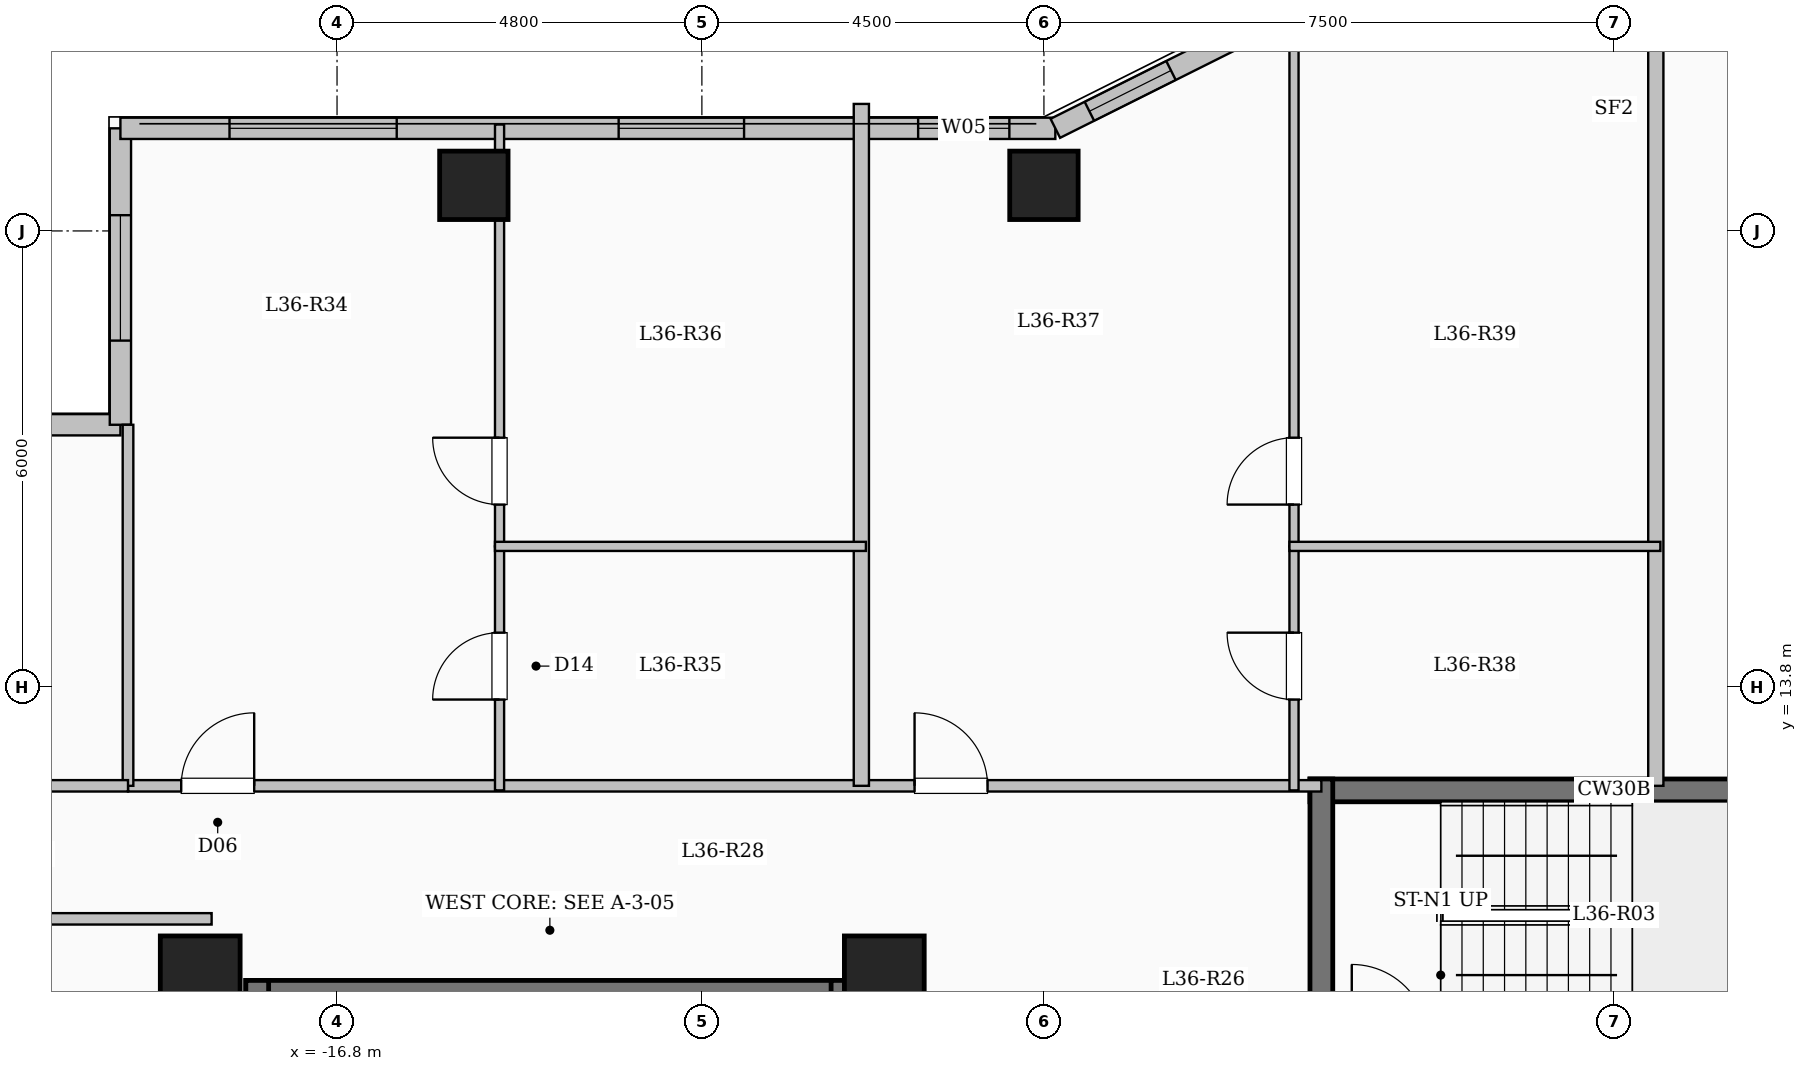
"""IFC4 building model, lengths in metres.
Left out: names, types, materials, properties, quantities, classifications, styles, units other than length and angle.
Written with IfcOpenShell. Run it as: python <this file> out.ifc"""

import sys

from ifc_helpers import new_model, si_unit, direction, frame, frame_2d, origin, origin_2d, place, context, subcontext, project, spatial, rectangle, extrude, element, fill, save


model = new_model("IFC4")
c1 = context("Model", 3, precision=1e-05, world=origin(), true_north=direction((0.0, 1.0)))
c2 = subcontext(c1, "Body", "Model", "MODEL_VIEW")
j1 = project(units=[si_unit("LENGTHUNIT", "METRE"), si_unit("PLANEANGLEUNIT", "RADIAN")], contexts=[c1])
p1 = place(None, origin())
s1 = spatial("IfcSite", under=j1, at=p1, CompositionType="ELEMENT")
p2 = place(p1, origin())
s2 = spatial("IfcBuilding", under=s1, at=p2, CompositionType="ELEMENT")
p3 = place(p2, frame((0.0, 0.0, 135.95)))
s3 = spatial("IfcBuildingStorey", under=s2, at=p3, CompositionType="ELEMENT", Elevation=135.95)
for number, where, z_axis, x_axis in (
    (1, (-9.6, 10.0, 0.0), (0.0, 0.0, 1.0), (1.0, 0.0, 0.0)),
    (2, (-18.6, 10.0, 0.0), (0.0, 0.0, 1.0), (1.0, 0.0, 0.0)),
):
    element("IfcColumn", number, at=place(p3, frame(where, z_axis=z_axis, x_axis=x_axis)), inside=s3, PredefinedType="COLUMN", context=c2, shape_type="SweptSolid", body=[
        extrude(rectangle(XDim=1.05, YDim=1.05, at=origin_2d()), origin(), (0.0, 0.0, 1.0), 3.35),
    ])
for number, where, z_axis, x_axis in (
    (3, (-15.0, 20.4, 0.0), (0.0, 0.0, 1.0), (1.0, 0.0, 0.0)),
    (4, (-7.5, 20.4, 0.0), (0.0, 0.0, 1.0), (1.0, 0.0, 0.0)),
):
    element("IfcColumn", number, at=place(p3, frame(where, z_axis=z_axis, x_axis=x_axis)), inside=s3, PredefinedType="COLUMN", context=c2, shape_type="SweptSolid", body=[
        extrude(rectangle(XDim=0.9, YDim=0.9, at=origin_2d()), origin(), (0.0, 0.0, 1.0), 3.35),
    ])
p4 = place(p3, frame((-25.05, 17.25, 0.0), z_axis=(0.0, 0.0, 1.0), x_axis=(1.0, 0.0, 0.0)))
e5 = element("IfcWall", 5, at=p4, inside=s3, PredefinedType="SOLIDWALL", context=c2, shape_type="SweptSolid", body=[
    extrude(rectangle(XDim=5.4, YDim=0.28, at=frame_2d((2.7, 0.0))), origin(), (0.0, 0.0, 1.0), 3.1),
])
p5 = place(p4, frame((1.725, 0.0, 0.9)))
e6 = element("IfcOpeningElement", 6, at=p5, cuts=e5, PredefinedType="OPENING", context=c2, shape_type="SweptSolid", body=[
    extrude(rectangle(XDim=2.0, YDim=1.7, at=frame_2d((1.0, 0.85))), frame((0.0, 0.15, 0.0), z_axis=(0.0, -1.0, 0.0), x_axis=(1.0, 0.0, 0.0)), (0.0, 0.0, 1.0), 0.3),
])
p6 = place(p3, frame((-19.65, 17.25, 0.0), z_axis=(0.0, 0.0, 1.0), x_axis=(0.0, 1.0, 0.0)))
e7 = element("IfcWall", 7, at=p6, inside=s3, PredefinedType="SOLIDWALL", context=c2, shape_type="SweptSolid", body=[
    extrude(rectangle(XDim=3.9, YDim=0.28, at=frame_2d((1.95, 0.0))), origin(), (0.0, 0.0, 1.0), 3.1),
])
p7 = place(p6, frame((1.107, 0.0, 0.9)))
e8 = element("IfcOpeningElement", 8, at=p7, cuts=e7, PredefinedType="OPENING", context=c2, shape_type="SweptSolid", body=[
    extrude(rectangle(XDim=1.65, YDim=1.6, at=frame_2d((0.825, 0.8))), frame((0.0, 0.15, 0.0), z_axis=(0.0, -1.0, 0.0), x_axis=(1.0, 0.0, 0.0)), (0.0, 0.0, 1.0), 0.3),
])
p8 = place(p3, frame((-19.65, 21.15, 0.0), z_axis=(0.0, 0.0, 1.0), x_axis=(1.0, 0.0, 0.0)))
e9 = element("IfcWall", 9, at=p8, inside=s3, PredefinedType="SOLIDWALL", context=c2, shape_type="SweptSolid", body=[
    extrude(rectangle(XDim=12.3, YDim=0.28, at=frame_2d((6.15, 0.0))), origin(), (0.0, 0.0, 1.0), 3.1),
])
p9 = place(p8, frame((1.435, 0.0, 0.9)))
e10 = element("IfcOpeningElement", 10, at=p9, cuts=e9, PredefinedType="OPENING", context=c2, shape_type="SweptSolid", body=[
    extrude(rectangle(XDim=2.2, YDim=1.75, at=frame_2d((1.1, 0.875))), frame((0.0, 0.15, 0.0), z_axis=(0.0, -1.0, 0.0), x_axis=(1.0, 0.0, 0.0)), (0.0, 0.0, 1.0), 0.3),
])
p10 = place(p8, frame((6.555, 0.0, 0.9)))
e11 = element("IfcOpeningElement", 11, at=p10, cuts=e9, PredefinedType="OPENING", context=c2, shape_type="SweptSolid", body=[
    extrude(rectangle(XDim=1.65, YDim=1.6, at=frame_2d((0.825, 0.8))), frame((0.0, 0.15, 0.0), z_axis=(0.0, -1.0, 0.0), x_axis=(1.0, 0.0, 0.0)), (0.0, 0.0, 1.0), 0.3),
])
p11 = place(p8, frame((10.495, 0.0, 0.95)))
e12 = element("IfcOpeningElement", 12, at=p11, cuts=e9, PredefinedType="OPENING", context=c2, shape_type="SweptSolid", body=[
    extrude(rectangle(XDim=1.2, YDim=1.5, at=frame_2d((0.6, 0.75))), frame((0.0, 0.15, 0.0), z_axis=(0.0, -1.0, 0.0), x_axis=(1.0, 0.0, 0.0)), (0.0, 0.0, 1.0), 0.3),
])
p12 = place(p3, frame((-7.35, 21.15, 0.0), z_axis=(0.0, 0.0, 1.0), x_axis=(0.894427191, 0.4472135955, 0.0)))
e13 = element("IfcWall", 13, at=p12, inside=s3, PredefinedType="SOLIDWALL", context=c2, shape_type="SweptSolid", body=[
    extrude(rectangle(XDim=3.354, YDim=0.28, at=frame_2d((1.677, 0.0))), origin(), (0.0, 0.0, 1.0), 3.1),
])
p13 = place(p12, frame((0.501, 0.0, 0.95)))
e14 = element("IfcOpeningElement", 14, at=p13, cuts=e13, PredefinedType="OPENING", context=c2, shape_type="SweptSolid", body=[
    extrude(rectangle(XDim=1.2, YDim=1.5, at=frame_2d((0.6, 0.75))), frame((0.0, 0.15, 0.0), z_axis=(0.0, -1.0, 0.0), x_axis=(1.0, 0.0, 0.0)), (0.0, 0.0, 1.0), 0.3),
])
p14 = place(p3, frame((-18.0, 9.79, 0.0), z_axis=(0.0, 0.0, 1.0), x_axis=(1.0, 0.0, 0.0)))
e15 = element("IfcWall", 15, at=p14, inside=s3, PredefinedType="SHEAR", context=c2, shape_type="SweptSolid", body=[
    extrude(rectangle(XDim=8.0, YDim=0.3, at=frame_2d((4.0, 0.0))), origin(), (0.0, 0.0, 1.0), 3.35),
])
for number, where, z_axis, x_axis in (
    (16, (-17.85, 6.35, 0.0), (0.0, 0.0, 1.0), (0.0, 1.0, 0.0)),
    (17, (-10.15, 6.35, 0.0), (0.0, 0.0, 1.0), (0.0, 1.0, 0.0)),
):
    element("IfcWall", number, at=place(p3, frame(where, z_axis=z_axis, x_axis=x_axis)), inside=s3, PredefinedType="SHEAR", context=c2, shape_type="SweptSolid", body=[
        extrude(rectangle(XDim=3.59, YDim=0.3, at=frame_2d((1.795, 0.0))), origin(), (0.0, 0.0, 1.0), 3.35),
    ])
p15 = place(p3, frame((-4.0, 12.44, 0.0), z_axis=(0.0, 0.0, 1.0), x_axis=(1.0, 0.0, 0.0)))
e18 = element("IfcWall", 18, at=p15, inside=s3, PredefinedType="SHEAR", context=c2, shape_type="SweptSolid", body=[
    extrude(rectangle(XDim=8.0, YDim=0.3, at=frame_2d((4.0, 0.0))), origin(), (0.0, 0.0, 1.0), 3.35),
])
p16 = place(p3, frame((-3.85, 9.0, 0.0), z_axis=(0.0, 0.0, 1.0), x_axis=(0.0, 1.0, 0.0)))
e19 = element("IfcWall", 19, at=p16, inside=s3, PredefinedType="SHEAR", context=c2, shape_type="SweptSolid", body=[
    extrude(rectangle(XDim=3.59, YDim=0.3, at=frame_2d((1.795, 0.0))), origin(), (0.0, 0.0, 1.0), 3.35),
])
p17 = place(p3, frame((-19.55, 12.5, 0.0), z_axis=(0.0, 0.0, 1.0), x_axis=(1.0, 0.0, 0.0)))
e20 = element("IfcWall", 20, at=p17, inside=s3, PredefinedType="PARTITIONING", context=c2, shape_type="SweptSolid", body=[
    extrude(rectangle(XDim=15.7, YDim=0.15, at=frame_2d((7.85, 0.0))), origin(), (0.0, 0.0, 1.0), 3.1),
])
p18 = place(p17, frame((0.7, 0.0, 0.0)))
e21 = element("IfcOpeningElement", 21, at=p18, cuts=e20, PredefinedType="OPENING", context=c2, shape_type="SweptSolid", body=[
    extrude(rectangle(XDim=0.96, YDim=2.15, at=frame_2d((0.48, 1.075))), frame((0.0, 0.085, 0.0), z_axis=(0.0, -1.0, 0.0), x_axis=(1.0, 0.0, 0.0)), (0.0, 0.0, 1.0), 0.17),
])
p19 = place(p17, frame((10.348, 0.0, 0.0)))
e22 = element("IfcOpeningElement", 22, at=p19, cuts=e20, PredefinedType="OPENING", context=c2, shape_type="SweptSolid", body=[
    extrude(rectangle(XDim=0.96, YDim=2.15, at=frame_2d((0.48, 1.075))), frame((0.0, 0.085, 0.0), z_axis=(0.0, -1.0, 0.0), x_axis=(1.0, 0.0, 0.0)), (0.0, 0.0, 1.0), 0.17),
])
p20 = place(p3, frame((0.55, 12.5, 0.0), z_axis=(0.0, 0.0, 1.0), x_axis=(0.0, 1.0, 0.0)))
e23 = element("IfcWall", 23, at=p20, inside=s3, PredefinedType="SOLIDWALL", context=c2, shape_type="SweptSolid", body=[
    extrude(rectangle(XDim=10.18, YDim=0.2, at=frame_2d((5.09, 0.0))), origin(), (0.0, 0.0, 1.0), 3.1),
])
p21 = place(p3, frame((-9.902, 12.5, 0.0), z_axis=(0.0, 0.0, 1.0), x_axis=(0.0, 1.0, 0.0)))
e24 = element("IfcWall", 24, at=p21, inside=s3, PredefinedType="SOLIDWALL", context=c2, shape_type="SweptSolid", body=[
    extrude(rectangle(XDim=8.971, YDim=0.2, at=frame_2d((4.485, 0.0))), origin(), (0.0, 0.0, 1.0), 3.1),
])
p22 = place(p3, frame((-14.662, 12.44, 0.0), z_axis=(0.0, 0.0, 1.0), x_axis=(0.0, 1.0, 0.0)))
e25 = element("IfcWall", 25, at=p22, inside=s3, PredefinedType="PARTITIONING", context=c2, shape_type="SweptSolid", body=[
    extrude(rectangle(XDim=3.21, YDim=0.12, at=frame_2d((1.605, 0.0))), origin(), (0.0, 0.0, 1.0), 3.1),
])
p23 = place(p22, frame((1.195, 0.0, 0.0)))
e26 = element("IfcOpeningElement", 26, at=p23, cuts=e25, PredefinedType="OPENING", context=c2, shape_type="SweptSolid", body=[
    extrude(rectangle(XDim=0.88, YDim=2.1, at=frame_2d((0.44, 1.05))), frame((0.0, 0.07, 0.0), z_axis=(0.0, -1.0, 0.0), x_axis=(1.0, 0.0, 0.0)), (0.0, 0.0, 1.0), 0.14),
])
p24 = place(p3, frame((-14.662, 15.65, 0.0), z_axis=(0.0, 0.0, 1.0), x_axis=(0.0, 1.0, 0.0)))
e27 = element("IfcWall", 27, at=p24, inside=s3, PredefinedType="PARTITIONING", context=c2, shape_type="SweptSolid", body=[
    extrude(rectangle(XDim=5.55, YDim=0.12, at=frame_2d((2.775, 0.0))), origin(), (0.0, 0.0, 1.0), 3.1),
])
p25 = place(p24, frame((0.55, 0.0, 0.0)))
e28 = element("IfcOpeningElement", 28, at=p25, cuts=e27, PredefinedType="OPENING", context=c2, shape_type="SweptSolid", body=[
    extrude(rectangle(XDim=0.88, YDim=2.1, at=frame_2d((0.44, 1.05))), frame((0.0, 0.07, 0.0), z_axis=(0.0, -1.0, 0.0), x_axis=(1.0, 0.0, 0.0)), (0.0, 0.0, 1.0), 0.14),
])
p26 = place(p3, frame((-14.722, 15.65, 0.0), z_axis=(0.0, 0.0, 1.0), x_axis=(1.0, 0.0, 0.0)))
e29 = element("IfcWall", 29, at=p26, inside=s3, PredefinedType="PARTITIONING", context=c2, shape_type="SweptSolid", body=[
    extrude(rectangle(XDim=4.88, YDim=0.12, at=frame_2d((2.44, 0.0))), origin(), (0.0, 0.0, 1.0), 2.685),
])
p27 = place(p3, frame((-4.21, 12.44, 0.0), z_axis=(0.0, 0.0, 1.0), x_axis=(0.0, 1.0, 0.0)))
e30 = element("IfcWall", 30, at=p27, inside=s3, PredefinedType="PARTITIONING", context=c2, shape_type="SweptSolid", body=[
    extrude(rectangle(XDim=3.21, YDim=0.12, at=frame_2d((1.605, 0.0))), origin(), (0.0, 0.0, 1.0), 3.1),
])
p28 = place(p27, frame((1.195, 0.0, 0.0)))
e31 = element("IfcOpeningElement", 31, at=p28, cuts=e30, PredefinedType="OPENING", context=c2, shape_type="SweptSolid", body=[
    extrude(rectangle(XDim=0.88, YDim=2.1, at=frame_2d((0.44, 1.05))), frame((0.0, 0.07, 0.0), z_axis=(0.0, -1.0, 0.0), x_axis=(1.0, 0.0, 0.0)), (0.0, 0.0, 1.0), 0.14),
])
p29 = place(p3, frame((-4.21, 15.65, 0.0), z_axis=(0.0, 0.0, 1.0), x_axis=(0.0, 1.0, 0.0)))
e32 = element("IfcWall", 32, at=p29, inside=s3, PredefinedType="PARTITIONING", context=c2, shape_type="SweptSolid", body=[
    extrude(rectangle(XDim=7.03, YDim=0.12, at=frame_2d((3.515, 0.0))), origin(), (0.0, 0.0, 1.0), 3.1),
])
p30 = place(p29, frame((0.55, 0.0, 0.0)))
e33 = element("IfcOpeningElement", 33, at=p30, cuts=e32, PredefinedType="OPENING", context=c2, shape_type="SweptSolid", body=[
    extrude(rectangle(XDim=0.88, YDim=2.1, at=frame_2d((0.44, 1.05))), frame((0.0, 0.07, 0.0), z_axis=(0.0, -1.0, 0.0), x_axis=(1.0, 0.0, 0.0)), (0.0, 0.0, 1.0), 0.14),
])
p31 = place(p3, frame((-4.27, 15.65, 0.0), z_axis=(0.0, 0.0, 1.0), x_axis=(1.0, 0.0, 0.0)))
e34 = element("IfcWall", 34, at=p31, inside=s3, PredefinedType="PARTITIONING", context=c2, shape_type="SweptSolid", body=[
    extrude(rectangle(XDim=4.88, YDim=0.12, at=frame_2d((2.44, 0.0))), origin(), (0.0, 0.0, 1.0), 2.685),
])
p32 = place(p3, frame((-25.08, 10.75, 0.0), z_axis=(0.0, 0.0, 1.0), x_axis=(1.0, 0.0, 0.0)))
e35 = element("IfcWall", 35, at=p32, inside=s3, PredefinedType="PARTITIONING", context=c2, shape_type="SweptSolid", body=[
    extrude(rectangle(XDim=6.63, YDim=0.15, at=frame_2d((3.315, 0.0))), origin(), (0.0, 0.0, 1.0), 3.1),
])
p33 = place(p3, frame((-19.55, 12.5, 0.0), z_axis=(0.0, 0.0, 1.0), x_axis=(0.0, 1.0, 0.0)))
e36 = element("IfcWall", 36, at=p33, inside=s3, PredefinedType="PARTITIONING", context=c2, shape_type="SweptSolid", body=[
    extrude(rectangle(XDim=4.75, YDim=0.14, at=frame_2d((2.375, 0.0))), origin(), (0.0, 0.0, 1.0), 3.1),
])
p34 = place(p3, frame((-25.08, 12.5, 0.0), z_axis=(0.0, 0.0, 1.0), x_axis=(1.0, 0.0, 0.0)))
e37 = element("IfcWall", 37, at=p34, inside=s3, PredefinedType="PARTITIONING", context=c2, shape_type="SweptSolid", body=[
    extrude(rectangle(XDim=5.53, YDim=0.15, at=frame_2d((2.765, 0.0))), origin(), (0.0, 0.0, 1.0), 3.1),
])
p35 = place(p34, frame((2.29, 0.0, 0.0)))
e38 = element("IfcOpeningElement", 38, at=p35, cuts=e37, PredefinedType="OPENING", context=c2, shape_type="SweptSolid", body=[
    extrude(rectangle(XDim=0.95, YDim=2.15, at=frame_2d((0.475, 1.075))), frame((0.0, 0.085, 0.0), z_axis=(0.0, -1.0, 0.0), x_axis=(1.0, 0.0, 0.0)), (0.0, 0.0, 1.0), 0.17),
])
p36 = place(p7, origin())
e39 = element("IfcWindow", 39, at=p36, inside=s3, PartitioningType="SINGLE_PANEL", PredefinedType="WINDOW", context=c2, shape_type="SweptSolid", body=[
    extrude(rectangle(XDim=1.65, YDim=1.6, at=frame_2d((0.825, 0.8))), frame((0.0, 0.03, 0.0), z_axis=(0.0, -1.0, 0.0), x_axis=(1.0, 0.0, 0.0)), (0.0, 0.0, 1.0), 0.06),
])
fill(e8, e39)
p37 = place(p9, origin())
e40 = element("IfcWindow", 40, at=p37, inside=s3, PartitioningType="SINGLE_PANEL", PredefinedType="WINDOW", context=c2, shape_type="SweptSolid", body=[
    extrude(rectangle(XDim=2.2, YDim=1.75, at=frame_2d((1.1, 0.875))), frame((0.0, 0.03, 0.0), z_axis=(0.0, -1.0, 0.0), x_axis=(1.0, 0.0, 0.0)), (0.0, 0.0, 1.0), 0.06),
])
fill(e10, e40)
p38 = place(p10, origin())
e41 = element("IfcWindow", 41, at=p38, inside=s3, PartitioningType="SINGLE_PANEL", PredefinedType="WINDOW", context=c2, shape_type="SweptSolid", body=[
    extrude(rectangle(XDim=1.65, YDim=1.6, at=frame_2d((0.825, 0.8))), frame((0.0, 0.03, 0.0), z_axis=(0.0, -1.0, 0.0), x_axis=(1.0, 0.0, 0.0)), (0.0, 0.0, 1.0), 0.06),
])
fill(e11, e41)
p39 = place(p11, origin())
e42 = element("IfcWindow", 42, at=p39, inside=s3, PartitioningType="SINGLE_PANEL", PredefinedType="WINDOW", context=c2, shape_type="SweptSolid", body=[
    extrude(rectangle(XDim=1.2, YDim=1.5, at=frame_2d((0.6, 0.75))), frame((0.0, 0.03, 0.0), z_axis=(0.0, -1.0, 0.0), x_axis=(1.0, 0.0, 0.0)), (0.0, 0.0, 1.0), 0.06),
])
fill(e12, e42)
p40 = place(p13, origin())
e43 = element("IfcWindow", 43, at=p40, inside=s3, PartitioningType="SINGLE_PANEL", PredefinedType="WINDOW", context=c2, shape_type="SweptSolid", body=[
    extrude(rectangle(XDim=1.2, YDim=1.5, at=frame_2d((0.6, 0.75))), frame((0.0, 0.03, 0.0), z_axis=(0.0, -1.0, 0.0), x_axis=(1.0, 0.0, 0.0)), (0.0, 0.0, 1.0), 0.06),
])
fill(e14, e43)
p41 = place(p18, origin())
e44 = element("IfcDoor", 44, at=p41, inside=s3, OperationType="SINGLE_SWING_RIGHT", PredefinedType="DOOR", context=c2, shape_type="SweptSolid", body=[
    extrude(rectangle(XDim=0.96, YDim=2.15, at=frame_2d((0.48, 1.075))), frame((0.0, 0.025, 0.0), z_axis=(0.0, -1.0, 0.0), x_axis=(1.0, 0.0, 0.0)), (0.0, 0.0, 1.0), 0.05),
])
fill(e21, e44)
p42 = place(p23, origin())
e45 = element("IfcDoor", 45, at=p42, inside=s3, OperationType="SINGLE_SWING_LEFT", PredefinedType="DOOR", context=c2, shape_type="SweptSolid", body=[
    extrude(rectangle(XDim=0.88, YDim=2.1, at=frame_2d((0.44, 1.05))), frame((0.0, 0.025, 0.0), z_axis=(0.0, -1.0, 0.0), x_axis=(1.0, 0.0, 0.0)), (0.0, 0.0, 1.0), 0.05),
])
fill(e26, e45)
p43 = place(p25, origin())
e46 = element("IfcDoor", 46, at=p43, inside=s3, OperationType="SINGLE_SWING_RIGHT", PredefinedType="DOOR", context=c2, shape_type="SweptSolid", body=[
    extrude(rectangle(XDim=0.88, YDim=2.1, at=frame_2d((0.44, 1.05))), frame((0.0, 0.025, 0.0), z_axis=(0.0, -1.0, 0.0), x_axis=(1.0, 0.0, 0.0)), (0.0, 0.0, 1.0), 0.05),
])
fill(e28, e46)
p44 = place(p19, origin())
e47 = element("IfcDoor", 47, at=p44, inside=s3, OperationType="SINGLE_SWING_LEFT", PredefinedType="DOOR", context=c2, shape_type="SweptSolid", body=[
    extrude(rectangle(XDim=0.96, YDim=2.15, at=frame_2d((0.48, 1.075))), frame((0.0, 0.025, 0.0), z_axis=(0.0, -1.0, 0.0), x_axis=(1.0, 0.0, 0.0)), (0.0, 0.0, 1.0), 0.05),
])
fill(e22, e47)
p45 = place(p28, origin())
e48 = element("IfcDoor", 48, at=p45, inside=s3, OperationType="SINGLE_SWING_RIGHT", PredefinedType="DOOR", context=c2, shape_type="SweptSolid", body=[
    extrude(rectangle(XDim=0.88, YDim=2.1, at=frame_2d((0.44, 1.05))), frame((0.0, 0.025, 0.0), z_axis=(0.0, -1.0, 0.0), x_axis=(1.0, 0.0, 0.0)), (0.0, 0.0, 1.0), 0.05),
])
fill(e31, e48)
p46 = place(p30, origin())
e49 = element("IfcDoor", 49, at=p46, inside=s3, OperationType="SINGLE_SWING_LEFT", PredefinedType="DOOR", context=c2, shape_type="SweptSolid", body=[
    extrude(rectangle(XDim=0.88, YDim=2.1, at=frame_2d((0.44, 1.05))), frame((0.0, 0.025, 0.0), z_axis=(0.0, -1.0, 0.0), x_axis=(1.0, 0.0, 0.0)), (0.0, 0.0, 1.0), 0.05),
])
fill(e33, e49)
save(model, sys.argv[1])
